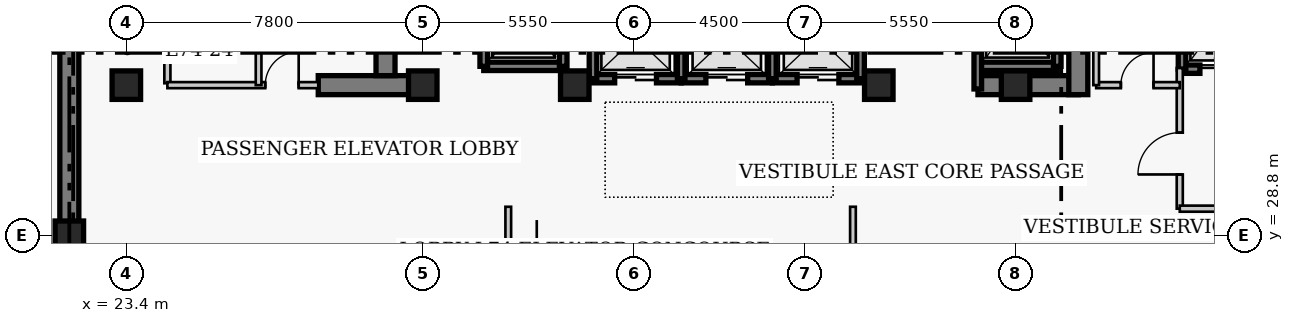
"""IFC4 building model, lengths in metres.
Left out: names, types, materials, properties, quantities, classifications, styles, units other than length and angle.
Written with IfcOpenShell. Run it as: python <this file> out.ifc"""

import sys

from ifc_helpers import new_model, si_unit, direction, frame, frame_2d, origin, origin_2d, place, context, subcontext, project, spatial, rectangle, extrude, element, fill, save


model = new_model("IFC4")
c1 = context("Model", 3, precision=1e-05, world=origin(), true_north=direction((0.0, 1.0)))
c2 = subcontext(c1, "Body", "Model", "MODEL_VIEW")
j1 = project(units=[si_unit("LENGTHUNIT", "METRE"), si_unit("PLANEANGLEUNIT", "RADIAN")], contexts=[c1])
p1 = place(None, origin())
s1 = spatial("IfcSite", under=j1, at=p1, CompositionType="ELEMENT")
p2 = place(p1, origin())
s2 = spatial("IfcBuilding", under=s1, at=p2, CompositionType="ELEMENT")
p3 = place(p2, frame((0.0, 0.0, 297.4)))
s3 = spatial("IfcBuildingStorey", under=s2, at=p3, CompositionType="ELEMENT", Elevation=297.4)
p4 = place(p3, frame((21.9, 27.05, 0.0), z_axis=(0.0, 0.0, 1.0), x_axis=(0.0, 1.0, 0.0)))
e1 = element("IfcWall", 1, at=p4, inside=s3, PredefinedType="SHEAR", context=c2, shape_type="SweptSolid", body=[
    extrude(rectangle(XDim=13.52, YDim=0.5, at=frame_2d((6.76, 0.0))), origin(), (0.0, 0.0, 1.0), 4.6),
])
p5 = place(p3, frame((28.45, 32.75, 0.0), z_axis=(0.0, 0.0, 1.0), x_axis=(1.0, 0.0, 0.0)))
e2 = element("IfcWall", 2, at=p5, inside=s3, PredefinedType="SHEAR", context=c2, shape_type="SweptSolid", body=[
    extrude(rectangle(XDim=2.4, YDim=0.5, at=frame_2d((1.2, 0.0))), origin(), (0.0, 0.0, 1.0), 4.6),
])
p6 = place(p3, frame((45.81, 32.75, 0.0), z_axis=(0.0, 0.0, 1.0), x_axis=(1.0, 0.0, 0.0)))
e3 = element("IfcWall", 3, at=p6, inside=s3, PredefinedType="SHEAR", context=c2, shape_type="SweptSolid", body=[
    extrude(rectangle(XDim=2.64, YDim=0.5, at=frame_2d((1.32, 0.0))), origin(), (0.0, 0.0, 1.0), 4.6),
])
p7 = place(p3, frame((30.22, 33.0, 0.0), z_axis=(0.0, 0.0, 1.0), x_axis=(0.0, 1.0, 0.0)))
e4 = element("IfcWall", 4, at=p7, inside=s3, PredefinedType="SHEAR", context=c2, shape_type="SweptSolid", body=[
    extrude(rectangle(XDim=7.32, YDim=0.5, at=frame_2d((3.66, 0.0))), origin(), (0.0, 0.0, 1.0), 4.6),
])
p8 = place(p3, frame((48.45, 32.5, 0.0), z_axis=(0.0, 0.0, 1.0), x_axis=(0.0, 1.0, 0.0)))
e5 = element("IfcWall", 5, at=p8, inside=s3, PredefinedType="SHEAR", context=c2, shape_type="SweptSolid", body=[
    extrude(rectangle(XDim=7.82, YDim=0.5, at=frame_2d((3.91, 0.0))), origin(), (0.0, 0.0, 1.0), 4.6),
])
p9 = place(p8, frame((5.7, 0.0, 0.0)))
e6 = element("IfcOpeningElement", 6, at=p9, cuts=e5, PredefinedType="OPENING", context=c2, shape_type="SweptSolid", body=[
    extrude(rectangle(XDim=1.1, YDim=2.15, at=frame_2d((0.55, 1.075))), frame((0.0, 0.26, 0.0), z_axis=(0.0, -1.0, 0.0), x_axis=(1.0, 0.0, 0.0)), (0.0, 0.0, 1.0), 0.52),
])
for number, where, z_axis, x_axis in (
    (7, (21.9, 28.8, 0.0), (0.0, 0.0, 1.0), (1.0, 0.0, 0.0)),
    (8, (23.4, 32.75, 0.0), (0.0, 0.0, 1.0), (1.0, 0.0, 0.0)),
    (9, (31.2, 32.75, 0.0), (0.0, 0.0, 1.0), (1.0, 0.0, 0.0)),
    (10, (35.2, 32.75, 0.0), (0.0, 0.0, 1.0), (1.0, 0.0, 0.0)),
    (11, (43.2, 32.75, 0.0), (0.0, 0.0, 1.0), (1.0, 0.0, 0.0)),
    (12, (46.8, 32.75, 0.0), (0.0, 0.0, 1.0), (1.0, 0.0, 0.0)),
):
    element("IfcColumn", number, at=place(p3, frame(where, z_axis=z_axis, x_axis=x_axis)), inside=s3, PredefinedType="COLUMN", context=c2, shape_type="SweptSolid", body=[
        extrude(rectangle(XDim=0.75, YDim=0.75, at=origin_2d()), origin(), (0.0, 0.0, 1.0), 4.6),
    ])
p10 = place(p3, frame((35.68, 32.92, 0.0), z_axis=(0.0, 0.0, 1.0), x_axis=(1.0, 0.0, 0.0)))
e13 = element("IfcWall", 13, at=p10, inside=s3, PredefinedType="SHEAR", context=c2, shape_type="SweptSolid", body=[
    extrude(rectangle(XDim=2.32, YDim=0.22, at=frame_2d((1.16, 0.0))), origin(), (0.0, 0.0, 1.0), 4.6),
])
p11 = place(p10, frame((0.57, 0.0, 0.0)))
e14 = element("IfcOpeningElement", 14, at=p11, cuts=e13, PredefinedType="OPENING", context=c2, shape_type="SweptSolid", body=[
    extrude(rectangle(XDim=1.1, YDim=2.15, at=frame_2d((0.55, 1.075))), frame((0.0, 0.12, 0.0), z_axis=(0.0, -1.0, 0.0), x_axis=(1.0, 0.0, 0.0)), (0.0, 0.0, 1.0), 0.24),
])
p12 = place(p3, frame((35.68, 32.92, 0.0), z_axis=(0.0, 0.0, 1.0), x_axis=(0.0, 1.0, 0.0)))
e15 = element("IfcWall", 15, at=p12, inside=s3, PredefinedType="SHEAR", context=c2, shape_type="SweptSolid", body=[
    extrude(rectangle(XDim=2.16, YDim=0.2, at=frame_2d((1.08, 0.0))), origin(), (0.0, 0.0, 1.0), 4.6),
])
p13 = place(p3, frame((38.0, 32.92, 0.0), z_axis=(0.0, 0.0, 1.0), x_axis=(1.0, 0.0, 0.0)))
e16 = element("IfcWall", 16, at=p13, inside=s3, PredefinedType="SHEAR", context=c2, shape_type="SweptSolid", body=[
    extrude(rectangle(XDim=2.4, YDim=0.22, at=frame_2d((1.2, 0.0))), origin(), (0.0, 0.0, 1.0), 4.6),
])
p14 = place(p13, frame((0.65, 0.0, 0.0)))
e17 = element("IfcOpeningElement", 17, at=p14, cuts=e16, PredefinedType="OPENING", context=c2, shape_type="SweptSolid", body=[
    extrude(rectangle(XDim=1.1, YDim=2.15, at=frame_2d((0.55, 1.075))), frame((0.0, 0.12, 0.0), z_axis=(0.0, -1.0, 0.0), x_axis=(1.0, 0.0, 0.0)), (0.0, 0.0, 1.0), 0.24),
])
p15 = place(p3, frame((38.0, 32.92, 0.0), z_axis=(0.0, 0.0, 1.0), x_axis=(0.0, 1.0, 0.0)))
e18 = element("IfcWall", 18, at=p15, inside=s3, PredefinedType="SHEAR", context=c2, shape_type="SweptSolid", body=[
    extrude(rectangle(XDim=2.16, YDim=0.2, at=frame_2d((1.08, 0.0))), origin(), (0.0, 0.0, 1.0), 4.6),
])
p16 = place(p3, frame((40.4, 32.92, 0.0), z_axis=(0.0, 0.0, 1.0), x_axis=(1.0, 0.0, 0.0)))
e19 = element("IfcWall", 19, at=p16, inside=s3, PredefinedType="SHEAR", context=c2, shape_type="SweptSolid", body=[
    extrude(rectangle(XDim=2.32, YDim=0.22, at=frame_2d((1.16, 0.0))), origin(), (0.0, 0.0, 1.0), 4.6),
])
p17 = place(p16, frame((0.65, 0.0, 0.0)))
e20 = element("IfcOpeningElement", 20, at=p17, cuts=e19, PredefinedType="OPENING", context=c2, shape_type="SweptSolid", body=[
    extrude(rectangle(XDim=1.1, YDim=2.15, at=frame_2d((0.55, 1.075))), frame((0.0, 0.12, 0.0), z_axis=(0.0, -1.0, 0.0), x_axis=(1.0, 0.0, 0.0)), (0.0, 0.0, 1.0), 0.24),
])
for number, where, z_axis, x_axis in (
    (21, (40.4, 32.92, 0.0), (0.0, 0.0, 1.0), (0.0, 1.0, 0.0)),
    (22, (42.72, 32.92, 0.0), (0.0, 0.0, 1.0), (0.0, 1.0, 0.0)),
):
    element("IfcWall", number, at=place(p3, frame(where, z_axis=z_axis, x_axis=x_axis)), inside=s3, PredefinedType="SHEAR", context=c2, shape_type="SweptSolid", body=[
        extrude(rectangle(XDim=2.16, YDim=0.2, at=frame_2d((1.08, 0.0))), origin(), (0.0, 0.0, 1.0), 4.6),
    ])
p18 = place(p3, frame((51.18, 33.17, 0.0), z_axis=(0.0, 0.0, 1.0), x_axis=(1.0, 0.0, 0.0)))
e23 = element("IfcWall", 23, at=p18, inside=s3, PredefinedType="SHEAR", context=c2, shape_type="SweptSolid", body=[
    extrude(rectangle(XDim=2.42, YDim=0.22, at=frame_2d((1.21, 0.0))), origin(), (0.0, 0.0, 1.0), 4.6),
])
p19 = place(p18, frame((0.47, 0.0, 0.0)))
e24 = element("IfcOpeningElement", 24, at=p19, cuts=e23, PredefinedType="OPENING", context=c2, shape_type="SweptSolid", body=[
    extrude(rectangle(XDim=1.3, YDim=2.15, at=frame_2d((0.65, 1.075))), frame((0.0, 0.12, 0.0), z_axis=(0.0, -1.0, 0.0), x_axis=(1.0, 0.0, 0.0)), (0.0, 0.0, 1.0), 0.24),
])
p20 = place(p3, frame((51.18, 33.17, 0.0), z_axis=(0.0, 0.0, 1.0), x_axis=(0.0, 1.0, 0.0)))
e25 = element("IfcWall", 25, at=p20, inside=s3, PredefinedType="SHEAR", context=c2, shape_type="SweptSolid", body=[
    extrude(rectangle(XDim=2.86, YDim=0.2, at=frame_2d((1.43, 0.0))), origin(), (0.0, 0.0, 1.0), 4.6),
])
p21 = place(p3, frame((32.805, 33.245, 0.0), z_axis=(0.0, 0.0, 1.0), x_axis=(1.0, 0.0, 0.0)))
e26 = element("IfcWall", 26, at=p21, inside=s3, PredefinedType="SHEAR", context=c2, shape_type="SweptSolid", body=[
    extrude(rectangle(XDim=2.09, YDim=0.22, at=frame_2d((1.045, 0.0))), origin(), (0.0, 0.0, 1.0), 4.6),
])
for number, where, z_axis, x_axis in (
    (27, (32.805, 33.245, 0.0), (0.0, 0.0, 1.0), (0.0, 1.0, 0.0)),
    (28, (34.895, 33.245, 0.0), (0.0, 0.0, 1.0), (0.0, 1.0, 0.0)),
):
    element("IfcWall", number, at=place(p3, frame(where, z_axis=z_axis, x_axis=x_axis)), inside=s3, PredefinedType="SHEAR", context=c2, shape_type="SweptSolid", body=[
        extrude(rectangle(XDim=2.91, YDim=0.2, at=frame_2d((1.455, 0.0))), origin(), (0.0, 0.0, 1.0), 4.6),
    ])
p22 = place(p3, frame((45.805, 33.245, 0.0), z_axis=(0.0, 0.0, 1.0), x_axis=(1.0, 0.0, 0.0)))
e29 = element("IfcWall", 29, at=p22, inside=s3, PredefinedType="SHEAR", context=c2, shape_type="SweptSolid", body=[
    extrude(rectangle(XDim=2.09, YDim=0.22, at=frame_2d((1.045, 0.0))), origin(), (0.0, 0.0, 1.0), 4.6),
])
p23 = place(p3, frame((45.805, 32.65, 0.0), z_axis=(0.0, 0.0, 1.0), x_axis=(0.0, 1.0, 0.0)))
e30 = element("IfcWall", 30, at=p23, inside=s3, PredefinedType="SHEAR", context=c2, shape_type="SweptSolid", body=[
    extrude(rectangle(XDim=3.505, YDim=0.2, at=frame_2d((1.752, 0.0))), origin(), (0.0, 0.0, 1.0), 4.6),
])
p24 = place(p3, frame((47.895, 33.245, 0.0), z_axis=(0.0, 0.0, 1.0), x_axis=(0.0, 1.0, 0.0)))
e31 = element("IfcWall", 31, at=p24, inside=s3, PredefinedType="SHEAR", context=c2, shape_type="SweptSolid", body=[
    extrude(rectangle(XDim=2.91, YDim=0.2, at=frame_2d((1.455, 0.0))), origin(), (0.0, 0.0, 1.0), 4.6),
])
p25 = place(p3, frame((24.48, 32.8, 0.0), z_axis=(0.0, 0.0, 1.0), x_axis=(0.0, 1.0, 0.0)))
e32 = element("IfcWall", 32, at=p25, inside=s3, PredefinedType="PARTITIONING", context=c2, shape_type="SweptSolid", body=[
    extrude(rectangle(XDim=3.57, YDim=0.16, at=frame_2d((1.785, 0.0))), origin(), (0.0, 0.0, 1.0), 4.31),
])
p26 = place(p25, frame((1.604, 0.0, 0.0)))
e33 = element("IfcOpeningElement", 33, at=p26, cuts=e32, PredefinedType="OPENING", context=c2, shape_type="SweptSolid", body=[
    extrude(rectangle(XDim=0.9, YDim=2.1, at=frame_2d((0.45, 1.05))), frame((0.0, 0.09, 0.0), z_axis=(0.0, -1.0, 0.0), x_axis=(1.0, 0.0, 0.0)), (0.0, 0.0, 1.0), 0.18),
])
p27 = place(p3, frame((51.12, 29.5, 0.0), z_axis=(0.0, 0.0, 1.0), x_axis=(0.0, 1.0, 0.0)))
e34 = element("IfcWall", 34, at=p27, inside=s3, PredefinedType="PARTITIONING", context=c2, shape_type="SweptSolid", body=[
    extrude(rectangle(XDim=3.7, YDim=0.16, at=frame_2d((1.85, 0.0))), origin(), (0.0, 0.0, 1.0), 4.31),
])
p28 = place(p27, frame((0.9, 0.0, 0.0)))
e35 = element("IfcOpeningElement", 35, at=p28, cuts=e34, PredefinedType="OPENING", context=c2, shape_type="SweptSolid", body=[
    extrude(rectangle(XDim=1.1, YDim=2.15, at=frame_2d((0.55, 1.075))), frame((0.0, 0.09, 0.0), z_axis=(0.0, -1.0, 0.0), x_axis=(1.0, 0.0, 0.0)), (0.0, 0.0, 1.0), 0.18),
])
p29 = place(p3, frame((51.12, 29.5, 0.0), z_axis=(0.0, 0.0, 1.0), x_axis=(1.0, 0.0, 0.0)))
e36 = element("IfcWall", 36, at=p29, inside=s3, PredefinedType="PARTITIONING", context=c2, shape_type="SweptSolid", body=[
    extrude(rectangle(XDim=5.63, YDim=0.16, at=frame_2d((2.815, 0.0))), origin(), (0.0, 0.0, 1.0), 4.31),
])
p30 = place(p3, frame((24.48, 32.75, 0.0), z_axis=(0.0, 0.0, 1.0), x_axis=(1.0, 0.0, 0.0)))
e37 = element("IfcWall", 37, at=p30, inside=s3, PredefinedType="PARTITIONING", context=c2, shape_type="SweptSolid", body=[
    extrude(rectangle(XDim=3.97, YDim=0.16, at=frame_2d((1.985, 0.0))), origin(), (0.0, 0.0, 1.0), 4.31),
])
p31 = place(p30, frame((2.575, 0.0, 0.0)))
e38 = element("IfcOpeningElement", 38, at=p31, cuts=e37, PredefinedType="OPENING", context=c2, shape_type="SweptSolid", body=[
    extrude(rectangle(XDim=0.88, YDim=2.05, at=frame_2d((0.44, 1.025))), frame((0.0, 0.09, 0.0), z_axis=(0.0, -1.0, 0.0), x_axis=(1.0, 0.0, 0.0)), (0.0, 0.0, 1.0), 0.18),
])
p32 = place(p3, frame((48.92, 32.75, 0.0), z_axis=(0.0, 0.0, 1.0), x_axis=(1.0, 0.0, 0.0)))
e39 = element("IfcWall", 39, at=p32, inside=s3, PredefinedType="PARTITIONING", context=c2, shape_type="SweptSolid", body=[
    extrude(rectangle(XDim=2.2, YDim=0.16, at=frame_2d((1.1, 0.0))), origin(), (0.0, 0.0, 1.0), 4.31),
])
p33 = place(p32, frame((0.65, 0.0, 0.0)))
e40 = element("IfcOpeningElement", 40, at=p33, cuts=e39, PredefinedType="OPENING", context=c2, shape_type="SweptSolid", body=[
    extrude(rectangle(XDim=0.86, YDim=2.05, at=frame_2d((0.43, 1.025))), frame((0.0, 0.09, 0.0), z_axis=(0.0, -1.0, 0.0), x_axis=(1.0, 0.0, 0.0)), (0.0, 0.0, 1.0), 0.18),
])
for number, where, z_axis, x_axis in (
    (41, (48.92, 32.75, 0.0), (0.0, 0.0, 1.0), (0.0, 1.0, 0.0)),
    (42, (26.88, 32.75, 0.0), (0.0, 0.0, 1.0), (0.0, 1.0, 0.0)),
):
    element("IfcWall", number, at=place(p3, frame(where, z_axis=z_axis, x_axis=x_axis)), inside=s3, PredefinedType="PARTITIONING", context=c2, shape_type="SweptSolid", body=[
        extrude(rectangle(XDim=3.62, YDim=0.15, at=frame_2d((1.81, 0.0))), origin(), (0.0, 0.0, 1.0), 4.31),
    ])
for number, where, z_axis, x_axis in (
    (43, (33.45, 24.78, 0.0), (0.0, 0.0, 1.0), (0.0, 1.0, 0.0)),
    (44, (42.52, 24.78, 0.0), (0.0, 0.0, 1.0), (0.0, 1.0, 0.0)),
):
    element("IfcWall", number, at=place(p3, frame(where, z_axis=z_axis, x_axis=x_axis)), inside=s3, PredefinedType="PARTITIONING", context=c2, shape_type="SweptSolid", body=[
        extrude(rectangle(XDim=4.77, YDim=0.15, at=frame_2d((2.385, 0.0))), origin(), (0.0, 0.0, 1.0), 4.31),
    ])
p34 = place(p11, origin())
e45 = element("IfcDoor", 45, at=p34, inside=s3, OperationType="DOUBLE_DOOR_SLIDING", PredefinedType="DOOR", context=c2, shape_type="SweptSolid", body=[
    extrude(rectangle(XDim=1.1, YDim=2.15, at=frame_2d((0.55, 1.075))), frame((0.0, 0.025, 0.0), z_axis=(0.0, -1.0, 0.0), x_axis=(1.0, 0.0, 0.0)), (0.0, 0.0, 1.0), 0.05),
])
fill(e14, e45)
p35 = place(p14, origin())
e46 = element("IfcDoor", 46, at=p35, inside=s3, OperationType="DOUBLE_DOOR_SLIDING", PredefinedType="DOOR", context=c2, shape_type="SweptSolid", body=[
    extrude(rectangle(XDim=1.1, YDim=2.15, at=frame_2d((0.55, 1.075))), frame((0.0, 0.025, 0.0), z_axis=(0.0, -1.0, 0.0), x_axis=(1.0, 0.0, 0.0)), (0.0, 0.0, 1.0), 0.05),
])
fill(e17, e46)
p36 = place(p17, origin())
e47 = element("IfcDoor", 47, at=p36, inside=s3, OperationType="DOUBLE_DOOR_SLIDING", PredefinedType="DOOR", context=c2, shape_type="SweptSolid", body=[
    extrude(rectangle(XDim=1.1, YDim=2.15, at=frame_2d((0.55, 1.075))), frame((0.0, 0.025, 0.0), z_axis=(0.0, -1.0, 0.0), x_axis=(1.0, 0.0, 0.0)), (0.0, 0.0, 1.0), 0.05),
])
fill(e20, e47)
p37 = place(p19, origin())
e48 = element("IfcDoor", 48, at=p37, inside=s3, OperationType="DOUBLE_DOOR_SLIDING", PredefinedType="DOOR", context=c2, shape_type="SweptSolid", body=[
    extrude(rectangle(XDim=1.3, YDim=2.15, at=frame_2d((0.65, 1.075))), frame((0.0, 0.025, 0.0), z_axis=(0.0, -1.0, 0.0), x_axis=(1.0, 0.0, 0.0)), (0.0, 0.0, 1.0), 0.05),
])
fill(e24, e48)
p38 = place(p28, origin())
e49 = element("IfcDoor", 49, at=p38, inside=s3, OperationType="SINGLE_SWING_LEFT", PredefinedType="DOOR", context=c2, shape_type="SweptSolid", body=[
    extrude(rectangle(XDim=1.1, YDim=2.15, at=frame_2d((0.55, 1.075))), frame((0.0, 0.025, 0.0), z_axis=(0.0, -1.0, 0.0), x_axis=(1.0, 0.0, 0.0)), (0.0, 0.0, 1.0), 0.05),
])
fill(e35, e49)
p39 = place(p31, origin())
e50 = element("IfcDoor", 50, at=p39, inside=s3, OperationType="SINGLE_SWING_RIGHT", PredefinedType="DOOR", context=c2, shape_type="SweptSolid", body=[
    extrude(rectangle(XDim=0.88, YDim=2.05, at=frame_2d((0.44, 1.025))), frame((0.0, 0.025, 0.0), z_axis=(0.0, -1.0, 0.0), x_axis=(1.0, 0.0, 0.0)), (0.0, 0.0, 1.0), 0.05),
])
fill(e38, e50)
p40 = place(p33, origin())
e51 = element("IfcDoor", 51, at=p40, inside=s3, OperationType="SINGLE_SWING_RIGHT", PredefinedType="DOOR", context=c2, shape_type="SweptSolid", body=[
    extrude(rectangle(XDim=0.86, YDim=2.05, at=frame_2d((0.43, 1.025))), frame((0.0, 0.025, 0.0), z_axis=(0.0, -1.0, 0.0), x_axis=(1.0, 0.0, 0.0)), (0.0, 0.0, 1.0), 0.05),
])
fill(e40, e51)
save(model, sys.argv[1])
